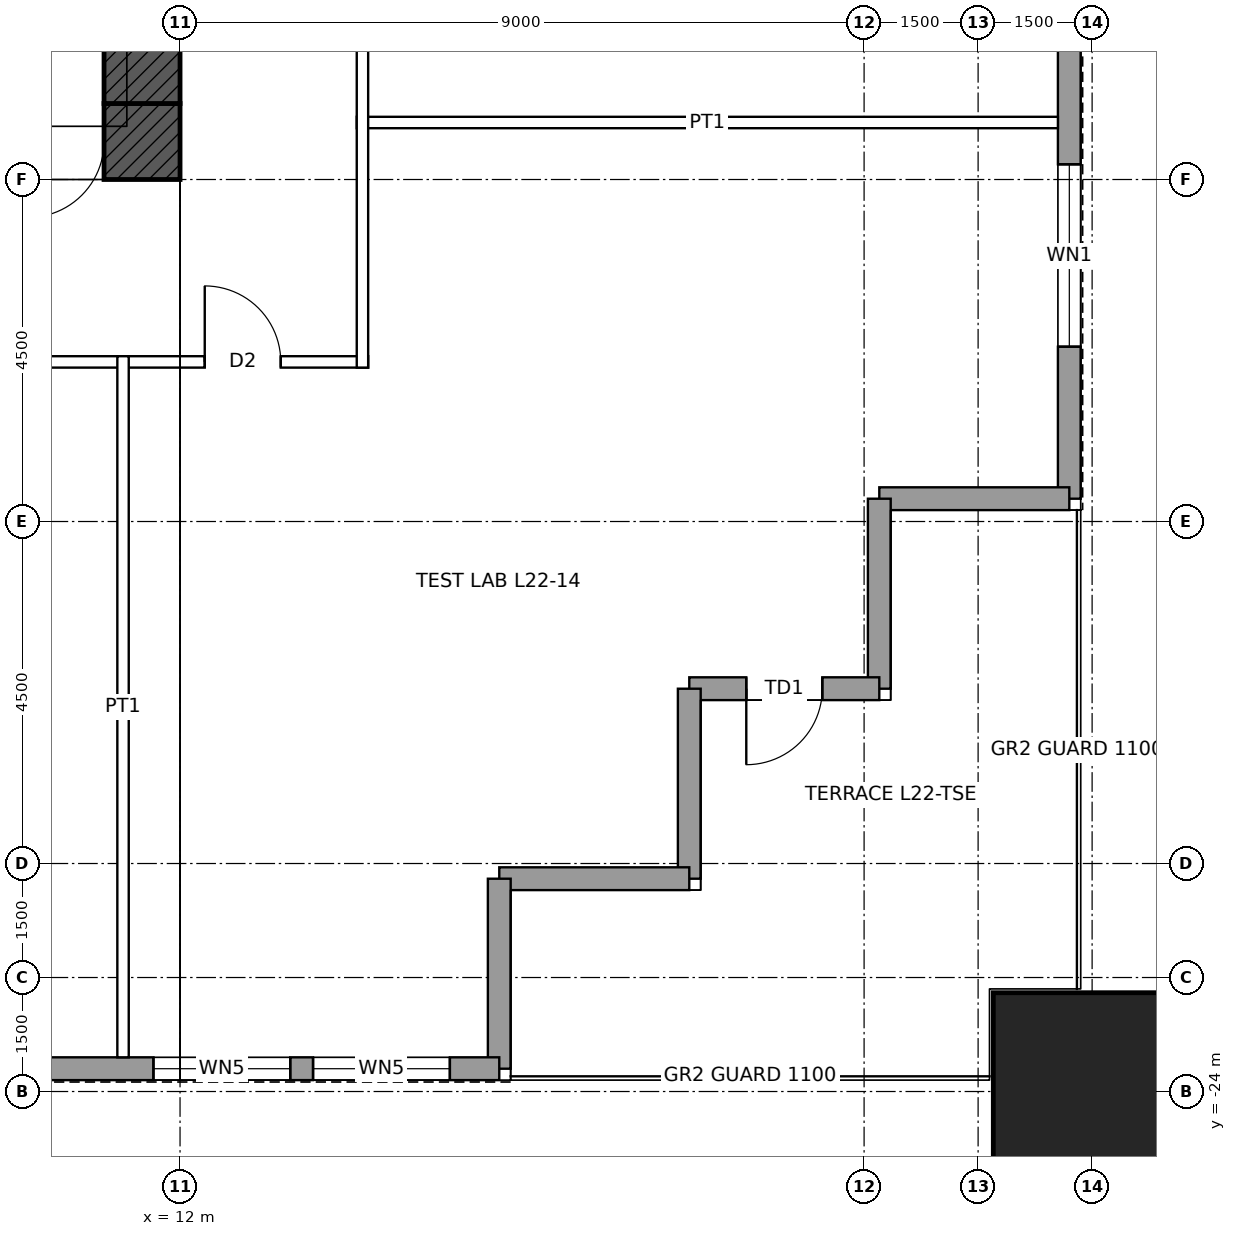
"""IFC4 building model, lengths in metres.
Left out: names, types, materials, properties, quantities, classifications, styles, units other than length and angle.
Written with IfcOpenShell. Run it as: python <this file> out.ifc"""

import sys

from ifc_helpers import new_model, si_unit, direction, frame, frame_2d, origin, origin_2d, place, context, subcontext, project, spatial, rectangle, hollow_rectangle, extrude, element, fill, save


model = new_model("IFC4")
c1 = context("Model", 3, precision=1e-05, world=origin(), true_north=direction((0.0, 1.0)))
c2 = subcontext(c1, "Body", "Model", "MODEL_VIEW")
j1 = project(units=[si_unit("LENGTHUNIT", "METRE"), si_unit("PLANEANGLEUNIT", "RADIAN")], contexts=[c1])
p1 = place(None, origin())
s1 = spatial("IfcSite", under=j1, at=p1, CompositionType="ELEMENT")
p2 = place(p1, origin())
s2 = spatial("IfcBuilding", under=s1, at=p2, CompositionType="ELEMENT")
p3 = place(p2, frame((0.0, 0.0, 113.4)))
s3 = spatial("IfcBuildingStorey", under=s2, at=p3, CompositionType="ELEMENT", Elevation=113.4)
p4 = place(p3, frame((24.0, -24.0, 0.0), z_axis=(0.0, 0.0, 1.0), x_axis=(1.0, 0.0, 0.0)))
e1 = element("IfcColumn", 1, at=p4, inside=s3, PredefinedType="COLUMN", context=c2, shape_type="SweptSolid", body=[
    extrude(hollow_rectangle(XDim=2.6, YDim=2.6, WallThickness=0.13, at=origin_2d()), origin(), (0.0, 0.0, 1.0), 4.5),
])
p5 = place(p3, frame((12.0, -11.5, 0.0), z_axis=(0.0, 0.0, 1.0), x_axis=(-1.0, 0.0, 0.0)))
e2 = element("IfcWall", 2, at=p5, inside=s3, PredefinedType="SHEAR", context=c2, shape_type="SweptSolid", body=[
    extrude(rectangle(XDim=24.0, YDim=1.0, at=frame_2d((12.0, 0.0))), origin(), (0.0, 0.0, 1.0), 4.5),
])
p6 = place(p5, frame((11.5, 0.0, 0.0)))
e3 = element("IfcOpeningElement", 3, at=p6, cuts=e2, PredefinedType="OPENING", context=c2, shape_type="SweptSolid", body=[
    extrude(rectangle(XDim=1.0, YDim=2.1, at=frame_2d((0.5, 1.05))), frame((0.0, 0.51, 0.0), z_axis=(0.0, -1.0, 0.0), x_axis=(1.0, 0.0, 0.0)), (0.0, 0.0, 1.0), 1.02),
])
p7 = place(p5, frame((1.0, 0.0, 0.0)))
e4 = element("IfcOpeningElement", 4, at=p7, cuts=e2, PredefinedType="OPENING", context=c2, shape_type="SweptSolid", body=[
    extrude(rectangle(XDim=1.0, YDim=2.4, at=frame_2d((0.5, 1.2))), frame((0.0, 0.51, 0.0), z_axis=(0.0, -1.0, 0.0), x_axis=(1.0, 0.0, 0.0)), (0.0, 0.0, 1.0), 1.02),
])
p8 = place(p3, frame((11.5, 11.0, 0.0), z_axis=(0.0, 0.0, 1.0), x_axis=(0.0, -1.0, 0.0)))
e5 = element("IfcWall", 5, at=p8, inside=s3, PredefinedType="SHEAR", context=c2, shape_type="SweptSolid", body=[
    extrude(rectangle(XDim=22.0, YDim=1.0, at=frame_2d((11.0, 0.0))), origin(), (0.0, 0.0, 1.0), 4.5),
])
p9 = place(p8, frame((10.5, 0.0, 0.0)))
e6 = element("IfcOpeningElement", 6, at=p9, cuts=e5, PredefinedType="OPENING", context=c2, shape_type="SweptSolid", body=[
    extrude(rectangle(XDim=1.0, YDim=2.4, at=frame_2d((0.5, 1.2))), frame((0.0, 0.51, 0.0), z_axis=(0.0, -1.0, 0.0), x_axis=(1.0, 0.0, 0.0)), (0.0, 0.0, 1.0), 1.02),
])
p10 = place(p3, frame((23.7, 16.2, 0.0), z_axis=(0.0, 0.0, 1.0), x_axis=(0.0, -1.0, 0.0)))
e7 = element("IfcWall", 7, at=p10, inside=s3, PredefinedType="SOLIDWALL", context=c2, shape_type="SweptSolid", body=[
    extrude(rectangle(XDim=32.4, YDim=0.3, at=frame_2d((16.2, 0.0))), origin(), (0.0, 0.0, 1.0), 4.3),
])
p11 = place(p10, frame((2.0, 0.0, 1.0)))
e8 = element("IfcOpeningElement", 8, at=p11, cuts=e7, PredefinedType="OPENING", context=c2, shape_type="SweptSolid", body=[
    extrude(rectangle(XDim=2.4, YDim=1.2, at=frame_2d((1.2, 0.6))), frame((0.0, 0.16, 0.0), z_axis=(0.0, -1.0, 0.0), x_axis=(1.0, 0.0, 0.0)), (0.0, 0.0, 1.0), 0.32),
])
p12 = place(p10, frame((8.6, 0.0, 1.0)))
e9 = element("IfcOpeningElement", 9, at=p12, cuts=e7, PredefinedType="OPENING", context=c2, shape_type="SweptSolid", body=[
    extrude(rectangle(XDim=1.8, YDim=1.2, at=frame_2d((0.9, 0.6))), frame((0.0, 0.16, 0.0), z_axis=(0.0, -1.0, 0.0), x_axis=(1.0, 0.0, 0.0)), (0.0, 0.0, 1.0), 0.32),
])
p13 = place(p10, frame((10.7, 0.0, 1.0)))
e10 = element("IfcOpeningElement", 10, at=p13, cuts=e7, PredefinedType="OPENING", context=c2, shape_type="SweptSolid", body=[
    extrude(rectangle(XDim=2.4, YDim=1.2, at=frame_2d((1.2, 0.6))), frame((0.0, 0.16, 0.0), z_axis=(0.0, -1.0, 0.0), x_axis=(1.0, 0.0, 0.0)), (0.0, 0.0, 1.0), 0.32),
])
p14 = place(p10, frame((13.4, 0.0, 1.0)))
e11 = element("IfcOpeningElement", 11, at=p14, cuts=e7, PredefinedType="OPENING", context=c2, shape_type="SweptSolid", body=[
    extrude(rectangle(XDim=2.4, YDim=1.2, at=frame_2d((1.2, 0.6))), frame((0.0, 0.16, 0.0), z_axis=(0.0, -1.0, 0.0), x_axis=(1.0, 0.0, 0.0)), (0.0, 0.0, 1.0), 0.32),
])
p15 = place(p10, frame((16.6, 0.0, 1.0)))
e12 = element("IfcOpeningElement", 12, at=p15, cuts=e7, PredefinedType="OPENING", context=c2, shape_type="SweptSolid", body=[
    extrude(rectangle(XDim=2.4, YDim=1.2, at=frame_2d((1.2, 0.6))), frame((0.0, 0.16, 0.0), z_axis=(0.0, -1.0, 0.0), x_axis=(1.0, 0.0, 0.0)), (0.0, 0.0, 1.0), 0.32),
])
p16 = place(p10, frame((19.3, 0.0, 1.0)))
e13 = element("IfcOpeningElement", 13, at=p16, cuts=e7, PredefinedType="OPENING", context=c2, shape_type="SweptSolid", body=[
    extrude(rectangle(XDim=2.4, YDim=1.2, at=frame_2d((1.2, 0.6))), frame((0.0, 0.16, 0.0), z_axis=(0.0, -1.0, 0.0), x_axis=(1.0, 0.0, 0.0)), (0.0, 0.0, 1.0), 0.32),
])
p17 = place(p10, frame((22.0, 0.0, 1.0)))
e14 = element("IfcOpeningElement", 14, at=p17, cuts=e7, PredefinedType="OPENING", context=c2, shape_type="SweptSolid", body=[
    extrude(rectangle(XDim=1.8, YDim=1.2, at=frame_2d((0.9, 0.6))), frame((0.0, 0.16, 0.0), z_axis=(0.0, -1.0, 0.0), x_axis=(1.0, 0.0, 0.0)), (0.0, 0.0, 1.0), 0.32),
])
p18 = place(p10, frame((28.0, 0.0, 1.0)))
e15 = element("IfcOpeningElement", 15, at=p18, cuts=e7, PredefinedType="OPENING", context=c2, shape_type="SweptSolid", body=[
    extrude(rectangle(XDim=2.4, YDim=1.2, at=frame_2d((1.2, 0.6))), frame((0.0, 0.16, 0.0), z_axis=(0.0, -1.0, 0.0), x_axis=(1.0, 0.0, 0.0)), (0.0, 0.0, 1.0), 0.32),
])
for number, where, z_axis, x_axis in (
    (16, (23.7, -16.2, 0.0), (0.0, 0.0, 1.0), (-1.0, 0.0, 0.0)),
    (17, (21.2, -16.2, 0.0), (0.0, 0.0, 1.0), (0.0, -1.0, 0.0)),
):
    element("IfcWall", number, at=place(p3, frame(where, z_axis=z_axis, x_axis=x_axis)), inside=s3, PredefinedType="SOLIDWALL", context=c2, shape_type="SweptSolid", body=[
        extrude(rectangle(XDim=2.5, YDim=0.3, at=frame_2d((1.25, 0.0))), origin(), (0.0, 0.0, 1.0), 4.3),
    ])
p19 = place(p3, frame((21.2, -18.7, 0.0), z_axis=(0.0, 0.0, 1.0), x_axis=(-1.0, 0.0, 0.0)))
e18 = element("IfcWall", 18, at=p19, inside=s3, PredefinedType="SOLIDWALL", context=c2, shape_type="SweptSolid", body=[
    extrude(rectangle(XDim=2.5, YDim=0.3, at=frame_2d((1.25, 0.0))), origin(), (0.0, 0.0, 1.0), 4.3),
])
p20 = place(p19, frame((0.75, 0.0, 0.0)))
e19 = element("IfcOpeningElement", 19, at=p20, cuts=e18, PredefinedType="OPENING", context=c2, shape_type="SweptSolid", body=[
    extrude(rectangle(XDim=1.0, YDim=2.4, at=frame_2d((0.5, 1.2))), frame((0.0, 0.16, 0.0), z_axis=(0.0, -1.0, 0.0), x_axis=(1.0, 0.0, 0.0)), (0.0, 0.0, 1.0), 0.32),
])
for number, where, z_axis, x_axis in (
    (20, (18.7, -18.7, 0.0), (0.0, 0.0, 1.0), (0.0, -1.0, 0.0)),
    (21, (18.7, -21.2, 0.0), (0.0, 0.0, 1.0), (-1.0, 0.0, 0.0)),
    (22, (16.2, -21.2, 0.0), (0.0, 0.0, 1.0), (0.0, -1.0, 0.0)),
):
    element("IfcWall", number, at=place(p3, frame(where, z_axis=z_axis, x_axis=x_axis)), inside=s3, PredefinedType="SOLIDWALL", context=c2, shape_type="SweptSolid", body=[
        extrude(rectangle(XDim=2.5, YDim=0.3, at=frame_2d((1.25, 0.0))), origin(), (0.0, 0.0, 1.0), 4.3),
    ])
p21 = place(p3, frame((16.2, -23.7, 0.0), z_axis=(0.0, 0.0, 1.0), x_axis=(-1.0, 0.0, 0.0)))
e23 = element("IfcWall", 23, at=p21, inside=s3, PredefinedType="SOLIDWALL", context=c2, shape_type="SweptSolid", body=[
    extrude(rectangle(XDim=32.4, YDim=0.3, at=frame_2d((16.2, 0.0))), origin(), (0.0, 0.0, 1.0), 4.3),
])
p22 = place(p21, frame((0.65, 0.0, 1.0)))
e24 = element("IfcOpeningElement", 24, at=p22, cuts=e23, PredefinedType="OPENING", context=c2, shape_type="SweptSolid", body=[
    extrude(rectangle(XDim=1.8, YDim=1.2, at=frame_2d((0.9, 0.6))), frame((0.0, 0.16, 0.0), z_axis=(0.0, -1.0, 0.0), x_axis=(1.0, 0.0, 0.0)), (0.0, 0.0, 1.0), 0.32),
])
p23 = place(p21, frame((2.75, 0.0, 1.0)))
e25 = element("IfcOpeningElement", 25, at=p23, cuts=e23, PredefinedType="OPENING", context=c2, shape_type="SweptSolid", body=[
    extrude(rectangle(XDim=1.8, YDim=1.2, at=frame_2d((0.9, 0.6))), frame((0.0, 0.16, 0.0), z_axis=(0.0, -1.0, 0.0), x_axis=(1.0, 0.0, 0.0)), (0.0, 0.0, 1.0), 0.32),
])
p24 = place(p21, frame((9.5, 0.0, 1.0)))
e26 = element("IfcOpeningElement", 26, at=p24, cuts=e23, PredefinedType="OPENING", context=c2, shape_type="SweptSolid", body=[
    extrude(rectangle(XDim=2.4, YDim=1.2, at=frame_2d((1.2, 0.6))), frame((0.0, 0.16, 0.0), z_axis=(0.0, -1.0, 0.0), x_axis=(1.0, 0.0, 0.0)), (0.0, 0.0, 1.0), 0.32),
])
p25 = place(p21, frame((13.0, 0.0, 1.0)))
e27 = element("IfcOpeningElement", 27, at=p25, cuts=e23, PredefinedType="OPENING", context=c2, shape_type="SweptSolid", body=[
    extrude(rectangle(XDim=2.4, YDim=1.2, at=frame_2d((1.2, 0.6))), frame((0.0, 0.16, 0.0), z_axis=(0.0, -1.0, 0.0), x_axis=(1.0, 0.0, 0.0)), (0.0, 0.0, 1.0), 0.32),
])
p26 = place(p21, frame((17.0, 0.0, 1.0)))
e28 = element("IfcOpeningElement", 28, at=p26, cuts=e23, PredefinedType="OPENING", context=c2, shape_type="SweptSolid", body=[
    extrude(rectangle(XDim=2.4, YDim=1.2, at=frame_2d((1.2, 0.6))), frame((0.0, 0.16, 0.0), z_axis=(0.0, -1.0, 0.0), x_axis=(1.0, 0.0, 0.0)), (0.0, 0.0, 1.0), 0.32),
])
p27 = place(p21, frame((20.5, 0.0, 1.0)))
e29 = element("IfcOpeningElement", 29, at=p27, cuts=e23, PredefinedType="OPENING", context=c2, shape_type="SweptSolid", body=[
    extrude(rectangle(XDim=2.4, YDim=1.2, at=frame_2d((1.2, 0.6))), frame((0.0, 0.16, 0.0), z_axis=(0.0, -1.0, 0.0), x_axis=(1.0, 0.0, 0.0)), (0.0, 0.0, 1.0), 0.32),
])
p28 = place(p21, frame((27.85, 0.0, 1.0)))
e30 = element("IfcOpeningElement", 30, at=p28, cuts=e23, PredefinedType="OPENING", context=c2, shape_type="SweptSolid", body=[
    extrude(rectangle(XDim=1.8, YDim=1.2, at=frame_2d((0.9, 0.6))), frame((0.0, 0.16, 0.0), z_axis=(0.0, -1.0, 0.0), x_axis=(1.0, 0.0, 0.0)), (0.0, 0.0, 1.0), 0.32),
])
p29 = place(p21, frame((29.95, 0.0, 1.0)))
e31 = element("IfcOpeningElement", 31, at=p29, cuts=e23, PredefinedType="OPENING", context=c2, shape_type="SweptSolid", body=[
    extrude(rectangle(XDim=1.8, YDim=1.2, at=frame_2d((0.9, 0.6))), frame((0.0, 0.16, 0.0), z_axis=(0.0, -1.0, 0.0), x_axis=(1.0, 0.0, 0.0)), (0.0, 0.0, 1.0), 0.32),
])
p30 = place(p3, frame((-14.475, -14.4, 0.0), z_axis=(0.0, 0.0, 1.0), x_axis=(1.0, 0.0, 0.0)))
e32 = element("IfcWall", 32, at=p30, inside=s3, PredefinedType="PARTITIONING", context=c2, shape_type="SweptSolid", body=[
    extrude(rectangle(XDim=28.95, YDim=0.15, at=frame_2d((14.475, 0.0))), origin(), (0.0, 0.0, 1.0), 4.3),
])
p31 = place(p30, frame((21.075, 0.0, 0.0)))
e33 = element("IfcOpeningElement", 33, at=p31, cuts=e32, PredefinedType="OPENING", context=c2, shape_type="SweptSolid", body=[
    extrude(rectangle(XDim=1.8, YDim=2.4, at=frame_2d((0.9, 1.2))), frame((0.0, 0.085, 0.0), z_axis=(0.0, -1.0, 0.0), x_axis=(1.0, 0.0, 0.0)), (0.0, 0.0, 1.0), 0.17),
])
p32 = place(p30, frame((13.575, 0.0, 0.0)))
e34 = element("IfcOpeningElement", 34, at=p32, cuts=e32, PredefinedType="OPENING", context=c2, shape_type="SweptSolid", body=[
    extrude(rectangle(XDim=1.8, YDim=2.4, at=frame_2d((0.9, 1.2))), frame((0.0, 0.085, 0.0), z_axis=(0.0, -1.0, 0.0), x_axis=(1.0, 0.0, 0.0)), (0.0, 0.0, 1.0), 0.17),
])
p33 = place(p30, frame((6.475, 0.0, 0.0)))
e35 = element("IfcOpeningElement", 35, at=p33, cuts=e32, PredefinedType="OPENING", context=c2, shape_type="SweptSolid", body=[
    extrude(rectangle(XDim=1.0, YDim=2.1, at=frame_2d((0.5, 1.05))), frame((0.0, 0.085, 0.0), z_axis=(0.0, -1.0, 0.0), x_axis=(1.0, 0.0, 0.0)), (0.0, 0.0, 1.0), 0.17),
])
p34 = place(p30, frame((26.8, 0.0, 0.0)))
e36 = element("IfcOpeningElement", 36, at=p34, cuts=e32, PredefinedType="OPENING", context=c2, shape_type="SweptSolid", body=[
    extrude(rectangle(XDim=1.0, YDim=2.1, at=frame_2d((0.5, 1.05))), frame((0.0, 0.085, 0.0), z_axis=(0.0, -1.0, 0.0), x_axis=(1.0, 0.0, 0.0)), (0.0, 0.0, 1.0), 0.17),
])
p35 = place(p30, frame((1.15, 0.0, 0.0)))
e37 = element("IfcOpeningElement", 37, at=p35, cuts=e32, PredefinedType="OPENING", context=c2, shape_type="SweptSolid", body=[
    extrude(rectangle(XDim=1.0, YDim=2.1, at=frame_2d((0.5, 1.05))), frame((0.0, 0.085, 0.0), z_axis=(0.0, -1.0, 0.0), x_axis=(1.0, 0.0, 0.0)), (0.0, 0.0, 1.0), 0.17),
])
for number, where, z_axis, x_axis in (
    (38, (14.325, -11.25, 0.0), (0.0, 0.0, 1.0), (1.0, 0.0, 0.0)),
    (39, (11.25, -23.55, 0.0), (0.0, 0.0, 1.0), (0.0, 1.0, 0.0)),
):
    element("IfcWall", number, at=place(p3, frame(where, z_axis=z_axis, x_axis=x_axis)), inside=s3, PredefinedType="PARTITIONING", context=c2, shape_type="SweptSolid", body=[
        extrude(rectangle(XDim=9.225, YDim=0.15, at=frame_2d((4.613, 0.0))), origin(), (0.0, 0.0, 1.0), 3.431),
    ])
p36 = place(p3, frame((14.4, -14.475, 0.0), z_axis=(0.0, 0.0, 1.0), x_axis=(0.0, 1.0, 0.0)))
e40 = element("IfcWall", 40, at=p36, inside=s3, PredefinedType="PARTITIONING", context=c2, shape_type="SweptSolid", body=[
    extrude(rectangle(XDim=28.95, YDim=0.15, at=frame_2d((14.475, 0.0))), origin(), (0.0, 0.0, 1.0), 4.3),
])
p37 = place(p36, frame((19.2, 0.0, 0.0)))
e41 = element("IfcOpeningElement", 41, at=p37, cuts=e40, PredefinedType="OPENING", context=c2, shape_type="SweptSolid", body=[
    extrude(rectangle(XDim=1.8, YDim=2.4, at=frame_2d((0.9, 1.2))), frame((0.0, 0.085, 0.0), z_axis=(0.0, -1.0, 0.0), x_axis=(1.0, 0.0, 0.0)), (0.0, 0.0, 1.0), 0.17),
])
p38 = place(p36, frame((7.95, 0.0, 0.0)))
e42 = element("IfcOpeningElement", 42, at=p38, cuts=e40, PredefinedType="OPENING", context=c2, shape_type="SweptSolid", body=[
    extrude(rectangle(XDim=1.8, YDim=2.4, at=frame_2d((0.9, 1.2))), frame((0.0, 0.085, 0.0), z_axis=(0.0, -1.0, 0.0), x_axis=(1.0, 0.0, 0.0)), (0.0, 0.0, 1.0), 0.17),
])
p39 = place(p18, origin())
e43 = element("IfcWindow", 43, at=p39, inside=s3, PartitioningType="SINGLE_PANEL", PredefinedType="WINDOW", context=c2, shape_type="SweptSolid", body=[
    extrude(rectangle(XDim=2.4, YDim=1.2, at=frame_2d((1.2, 0.6))), frame((0.0, 0.03, 0.0), z_axis=(0.0, -1.0, 0.0), x_axis=(1.0, 0.0, 0.0)), (0.0, 0.0, 1.0), 0.06),
])
fill(e15, e43)
p40 = place(p20, origin())
e44 = element("IfcDoor", 44, at=p40, inside=s3, OperationType="SINGLE_SWING_RIGHT", PredefinedType="DOOR", context=c2, shape_type="SweptSolid", body=[
    extrude(rectangle(XDim=1.0, YDim=2.4, at=frame_2d((0.5, 1.2))), frame((0.0, 0.025, 0.0), z_axis=(0.0, -1.0, 0.0), x_axis=(1.0, 0.0, 0.0)), (0.0, 0.0, 1.0), 0.05),
])
fill(e19, e44)
p41 = place(p22, origin())
e45 = element("IfcWindow", 45, at=p41, inside=s3, PartitioningType="SINGLE_PANEL", PredefinedType="WINDOW", context=c2, shape_type="SweptSolid", body=[
    extrude(rectangle(XDim=1.8, YDim=1.2, at=frame_2d((0.9, 0.6))), frame((0.0, 0.03, 0.0), z_axis=(0.0, -1.0, 0.0), x_axis=(1.0, 0.0, 0.0)), (0.0, 0.0, 1.0), 0.06),
])
fill(e24, e45)
p42 = place(p23, origin())
e46 = element("IfcWindow", 46, at=p42, inside=s3, PartitioningType="SINGLE_PANEL", PredefinedType="WINDOW", context=c2, shape_type="SweptSolid", body=[
    extrude(rectangle(XDim=1.8, YDim=1.2, at=frame_2d((0.9, 0.6))), frame((0.0, 0.03, 0.0), z_axis=(0.0, -1.0, 0.0), x_axis=(1.0, 0.0, 0.0)), (0.0, 0.0, 1.0), 0.06),
])
fill(e25, e46)
p43 = place(p7, origin())
e47 = element("IfcDoor", 47, at=p43, inside=s3, OperationType="SINGLE_SWING_RIGHT", PredefinedType="DOOR", context=c2, shape_type="SweptSolid", body=[
    extrude(rectangle(XDim=1.0, YDim=2.4, at=frame_2d((0.5, 1.2))), frame((0.0, 0.485, 0.0), z_axis=(0.0, -1.0, 0.0), x_axis=(1.0, 0.0, 0.0)), (0.0, 0.0, 1.0), 0.05),
])
fill(e4, e47)
p44 = place(p34, origin())
e48 = element("IfcDoor", 48, at=p44, inside=s3, OperationType="SINGLE_SWING_LEFT", PredefinedType="DOOR", context=c2, shape_type="SweptSolid", body=[
    extrude(rectangle(XDim=1.0, YDim=2.1, at=frame_2d((0.5, 1.05))), frame((0.0, 0.025, 0.0), z_axis=(0.0, -1.0, 0.0), x_axis=(1.0, 0.0, 0.0)), (0.0, 0.0, 1.0), 0.05),
])
fill(e36, e48)
save(model, sys.argv[1])
